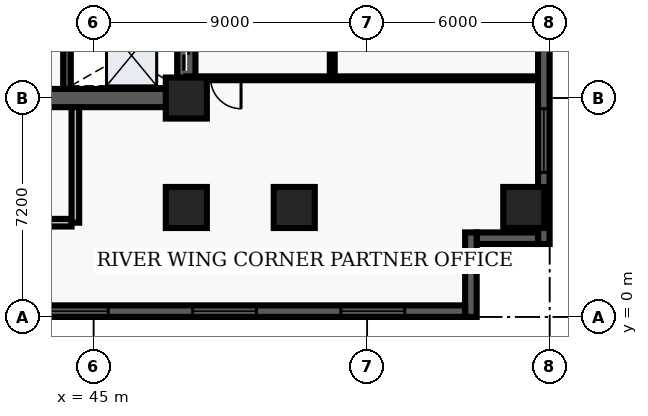
"""IFC4 building model, lengths in metres.
Left out: names, types, materials, properties, quantities, classifications, styles, units other than length and angle.
Written with IfcOpenShell. Run it as: python <this file> out.ifc"""

import sys

from ifc_helpers import new_model, entity, si_unit, converted_unit, direction, frame, origin_with_axes, origin_2d_with_axis, place, context, subcontext, project, spatial, polyline, rectangle, outline, extrude, element, fill, save


model = new_model("IFC4")
c1 = context("Model", 3, precision=1e-05, world=origin_with_axes(), true_north=direction((0.0, 1.0)))
c2 = subcontext(c1, "Body", "Model", "MODEL_VIEW")
j1 = project(units=[si_unit("LENGTHUNIT", "METRE"), converted_unit("PLANEANGLEUNIT", "DEGREE", entity("IfcPlaneAngleMeasure", 0.017), si_unit("PLANEANGLEUNIT", "RADIAN"), dimensions=[0, 0, 0, 0, 0, 0, 0])], contexts=[c1])
p1 = place(None, origin_with_axes())
s1 = spatial("IfcSite", under=j1, at=p1, CompositionType="ELEMENT")
p2 = place(p1, origin_with_axes())
s2 = spatial("IfcBuilding", under=s1, at=p2, CompositionType="ELEMENT")
p3 = place(p2, frame((0.0, 0.0, 60.0), z_axis=(0.0, 0.0, 1.0), x_axis=(1.0, 0.0, 0.0)))
s3 = spatial("IfcBuildingStorey", under=s2, at=p3, CompositionType="ELEMENT", Elevation=60.0)
p4 = place(p3, frame((40.2, 7.2, 0.0), z_axis=(0.0, 0.0, 1.0), x_axis=(1.0, 0.0, 0.0)))
e1 = element("IfcWall", 1, at=p4, inside=s3, PredefinedType="SHEAR", context=c2, shape_type="SweptSolid", body=[
    extrude(outline(polyline([(0.0, -0.3), (7.85, -0.3), (7.85, 0.3), (0.0, 0.3), (0.0, -0.3)])), origin_with_axes(), (0.0, 0.0, 1.0), 3.66),
])
p5 = place(p4, frame((2.175, 0.0, 0.0), z_axis=(0.0, 0.0, 1.0), x_axis=(1.0, 0.0, 0.0)))
e2 = element("IfcOpeningElement", 2, at=p5, cuts=e1, PredefinedType="OPENING", context=c2, shape_type="SweptSolid", body=[
    extrude(rectangle(XDim=1.05, YDim=0.62, at=origin_2d_with_axis()), origin_with_axes(), (0.0, 0.0, 1.0), 2.15),
])
p6 = place(p3, frame((48.05, 7.2, 0.0), z_axis=(0.0, 0.0, 1.0), x_axis=(0.0, 1.0, 0.0)))
e3 = element("IfcWall", 3, at=p6, inside=s3, PredefinedType="SHEAR", context=c2, shape_type="SweptSolid", body=[
    extrude(outline(polyline([(0.0, -0.3), (15.6, -0.3), (15.6, 0.3), (0.0, 0.3), (0.0, -0.3)])), origin_with_axes(), (0.0, 0.0, 1.0), 3.66),
])
p7 = place(p6, frame((1.425, 0.0, 0.0), z_axis=(0.0, 0.0, 1.0), x_axis=(1.0, 0.0, 0.0)))
e4 = element("IfcOpeningElement", 4, at=p7, cuts=e3, PredefinedType="OPENING", context=c2, shape_type="SweptSolid", body=[
    extrude(rectangle(XDim=1.05, YDim=0.62, at=origin_2d_with_axis()), origin_with_axes(), (0.0, 0.0, 1.0), 2.15),
])
p8 = place(p6, frame((3.475, 0.0, 0.0), z_axis=(0.0, 0.0, 1.0), x_axis=(1.0, 0.0, 0.0)))
e5 = element("IfcOpeningElement", 5, at=p8, cuts=e3, PredefinedType="OPENING", context=c2, shape_type="SweptSolid", body=[
    extrude(rectangle(XDim=1.05, YDim=0.62, at=origin_2d_with_axis()), origin_with_axes(), (0.0, 0.0, 1.0), 2.15),
])
p9 = place(p6, frame((5.625, 0.0, 0.0), z_axis=(0.0, 0.0, 1.0), x_axis=(1.0, 0.0, 0.0)))
e6 = element("IfcOpeningElement", 6, at=p9, cuts=e3, PredefinedType="OPENING", context=c2, shape_type="SweptSolid", body=[
    extrude(rectangle(XDim=0.95, YDim=0.62, at=origin_2d_with_axis()), origin_with_axes(), (0.0, 0.0, 1.0), 2.15),
])
p10 = place(p3, frame((44.125, 7.5, 0.0), z_axis=(0.0, 0.0, 1.0), x_axis=(0.0, 1.0, 0.0)))
e7 = element("IfcWall", 7, at=p10, inside=s3, PredefinedType="SHEAR", context=c2, shape_type="SweptSolid", body=[
    extrude(outline(polyline([(0.0, -0.125), (15.0, -0.125), (15.0, 0.125), (0.0, 0.125), (0.0, -0.125)])), origin_with_axes(), (0.0, 0.0, 1.0), 3.66),
])
p11 = place(p3, frame((40.325, 3.1, 0.0), z_axis=(0.0, 0.0, 1.0), x_axis=(1.0, 0.0, 0.0)))
e8 = element("IfcWall", 8, at=p11, inside=s3, PredefinedType="SOLIDWALL", context=c2, shape_type="SweptSolid", body=[
    extrude(outline(polyline([(0.0, -0.125), (3.95, -0.125), (3.95, 0.125), (0.0, 0.125), (0.0, -0.125)])), origin_with_axes(), (0.0, 0.0, 1.0), 2.7),
])
p12 = place(p3, frame((44.4, 3.1, 0.0), z_axis=(0.0, 0.0, 1.0), x_axis=(0.0, 1.0, 0.0)))
e9 = element("IfcWall", 9, at=p12, inside=s3, PredefinedType="SOLIDWALL", context=c2, shape_type="SweptSolid", body=[
    extrude(outline(polyline([(0.0, -0.125), (3.8, -0.125), (3.8, 0.125), (0.0, 0.125), (0.0, -0.125)])), origin_with_axes(), (0.0, 0.0, 1.0), 2.7),
])
for number, where, z_axis, x_axis in (
    (10, (48.05, 3.6, 0.0), (0.0, 0.0, 1.0), (1.0, 0.0, 0.0)),
    (11, (48.05, 7.2, 0.0), (0.0, 0.0, 1.0), (1.0, 0.0, 0.0)),
    (12, (51.6, 3.6, 0.0), (0.0, 0.0, 1.0), (1.0, 0.0, 0.0)),
    (13, (59.15, 3.6, 0.0), (0.0, 0.0, 1.0), (1.0, 0.0, 0.0)),
):
    element("IfcColumn", number, at=place(p3, frame(where, z_axis=z_axis, x_axis=x_axis)), inside=s3, PredefinedType="COLUMN", context=c2, shape_type="SweptSolid", body=[
        extrude(rectangle(XDim=1.35, YDim=1.35, at=origin_2d_with_axis()), origin_with_axes(), (0.0, 0.0, 1.0), 3.9),
    ])
p13 = place(p3, frame((52.85, 7.85, 0.0), z_axis=(0.0, 0.0, 1.0), x_axis=(0.0, 1.0, 0.0)))
e14 = element("IfcWall", 14, at=p13, inside=s3, PredefinedType="PARTITIONING", context=c2, shape_type="SweptSolid", body=[
    extrude(outline(polyline([(0.0, -0.08), (18.8, -0.08), (18.8, 0.08), (0.0, 0.08), (0.0, -0.08)])), origin_with_axes(), (0.0, 0.0, 1.0), 2.7),
])
p14 = place(p13, frame((4.484, 0.0, 0.0), z_axis=(0.0, 0.0, 1.0), x_axis=(1.0, 0.0, 0.0)))
e15 = element("IfcOpeningElement", 15, at=p14, cuts=e14, PredefinedType="OPENING", context=c2, shape_type="SweptSolid", body=[
    extrude(rectangle(XDim=1.0, YDim=0.18, at=origin_2d_with_axis()), origin_with_axes(), (0.0, 0.0, 1.0), 2.15),
])
p15 = place(p13, frame((7.687, 0.0, 0.0), z_axis=(0.0, 0.0, 1.0), x_axis=(1.0, 0.0, 0.0)))
e16 = element("IfcOpeningElement", 16, at=p15, cuts=e14, PredefinedType="OPENING", context=c2, shape_type="SweptSolid", body=[
    extrude(rectangle(XDim=1.0, YDim=0.18, at=origin_2d_with_axis()), origin_with_axes(), (0.0, 0.0, 1.0), 2.15),
])
p16 = place(p13, frame((13.79, 0.0, 0.0), z_axis=(0.0, 0.0, 1.0), x_axis=(1.0, 0.0, 0.0)))
e17 = element("IfcOpeningElement", 17, at=p16, cuts=e14, PredefinedType="OPENING", context=c2, shape_type="SweptSolid", body=[
    extrude(rectangle(XDim=1.0, YDim=0.18, at=origin_2d_with_axis()), origin_with_axes(), (0.0, 0.0, 1.0), 2.15),
])
p17 = place(p3, frame((59.64, 7.85, 0.0), z_axis=(0.0, 0.0, 1.0), x_axis=(-1.0, 0.0, 0.0)))
e18 = element("IfcWall", 18, at=p17, inside=s3, PredefinedType="PARTITIONING", context=c2, shape_type="SweptSolid", body=[
    extrude(outline(polyline([(0.0, -0.062), (11.59, -0.062), (11.59, 0.062), (0.0, 0.062), (0.0, -0.062)])), origin_with_axes(), (0.0, 0.0, 1.0), 2.7),
])
p18 = place(p17, frame((10.29, 0.0, 0.0), z_axis=(0.0, 0.0, 1.0), x_axis=(1.0, 0.0, 0.0)))
e19 = element("IfcOpeningElement", 19, at=p18, cuts=e18, PredefinedType="OPENING", context=c2, shape_type="SweptSolid", body=[
    extrude(rectangle(XDim=1.0, YDim=0.145, at=origin_2d_with_axis()), origin_with_axes(), (0.0, 0.0, 1.0), 2.15),
])
p19 = place(p3, frame((59.81, 26.02, 0.0), z_axis=(0.0, 0.0, 1.0), x_axis=(0.0, -1.0, 0.0)))
e20 = element("IfcWall", 20, at=p19, inside=s3, PredefinedType="SOLIDWALL", context=c2, shape_type="SweptSolid", body=[
    extrude(outline(polyline([(0.0, -0.19), (23.62, -0.19), (23.62, 0.19), (0.0, 0.19), (0.0, -0.19)])), origin_with_axes(), (0.0, 0.0, 1.0), 3.66),
])
p20 = place(p19, frame((3.853, 0.0, 0.45), z_axis=(0.0, 0.0, 1.0), x_axis=(1.0, 0.0, 0.0)))
e21 = element("IfcOpeningElement", 21, at=p20, cuts=e20, PredefinedType="OPENING", context=c2, shape_type="SweptSolid", body=[
    extrude(rectangle(XDim=2.1, YDim=0.4, at=origin_2d_with_axis()), origin_with_axes(), (0.0, 0.0, 1.0), 2.2),
])
p21 = place(p19, frame((20.218, 0.0, 0.45), z_axis=(0.0, 0.0, 1.0), x_axis=(1.0, 0.0, 0.0)))
e22 = element("IfcOpeningElement", 22, at=p21, cuts=e20, PredefinedType="OPENING", context=c2, shape_type="SweptSolid", body=[
    extrude(rectangle(XDim=2.1, YDim=0.4, at=origin_2d_with_axis()), origin_with_axes(), (0.0, 0.0, 1.0), 2.2),
])
p22 = place(p3, frame((59.62, 2.59, 0.0), z_axis=(0.0, 0.0, 1.0), x_axis=(-1.0, 0.0, 0.0)))
e23 = element("IfcWall", 23, at=p22, inside=s3, PredefinedType="SOLIDWALL", context=c2, shape_type="SweptSolid", body=[
    extrude(outline(polyline([(0.0, -0.19), (2.02, -0.19), (2.02, 0.19), (0.0, 0.19), (0.0, -0.19)])), origin_with_axes(), (0.0, 0.0, 1.0), 3.66),
])
p23 = place(p3, frame((57.41, 2.78, 0.0), z_axis=(0.0, 0.0, 1.0), x_axis=(0.0, -1.0, 0.0)))
e24 = element("IfcWall", 24, at=p23, inside=s3, PredefinedType="SOLIDWALL", context=c2, shape_type="SweptSolid", body=[
    extrude(outline(polyline([(0.0, -0.19), (2.78, -0.19), (2.78, 0.19), (0.0, 0.19), (0.0, -0.19)])), origin_with_axes(), (0.0, 0.0, 1.0), 3.66),
])
p24 = place(p3, frame((57.22, 0.19, 0.0), z_axis=(0.0, 0.0, 1.0), x_axis=(-1.0, 0.0, 0.0)))
e25 = element("IfcWall", 25, at=p24, inside=s3, PredefinedType="SOLIDWALL", context=c2, shape_type="SweptSolid", body=[
    extrude(outline(polyline([(0.0, -0.19), (54.82, -0.19), (54.82, 0.19), (0.0, 0.19), (0.0, -0.19)])), origin_with_axes(), (0.0, 0.0, 1.0), 3.66),
])
p25 = place(p24, frame((3.037, 0.0, 0.45), z_axis=(0.0, 0.0, 1.0), x_axis=(1.0, 0.0, 0.0)))
e26 = element("IfcOpeningElement", 26, at=p25, cuts=e25, PredefinedType="OPENING", context=c2, shape_type="SweptSolid", body=[
    extrude(rectangle(XDim=2.1, YDim=0.4, at=origin_2d_with_axis()), origin_with_axes(), (0.0, 0.0, 1.0), 2.2),
])
p26 = place(p24, frame((7.912, 0.0, 0.45), z_axis=(0.0, 0.0, 1.0), x_axis=(1.0, 0.0, 0.0)))
e27 = element("IfcOpeningElement", 27, at=p26, cuts=e25, PredefinedType="OPENING", context=c2, shape_type="SweptSolid", body=[
    extrude(rectangle(XDim=2.1, YDim=0.4, at=origin_2d_with_axis()), origin_with_axes(), (0.0, 0.0, 1.0), 2.2),
])
p27 = place(p24, frame((12.786, 0.0, 0.45), z_axis=(0.0, 0.0, 1.0), x_axis=(1.0, 0.0, 0.0)))
e28 = element("IfcOpeningElement", 28, at=p27, cuts=e25, PredefinedType="OPENING", context=c2, shape_type="SweptSolid", body=[
    extrude(rectangle(XDim=2.1, YDim=0.4, at=origin_2d_with_axis()), origin_with_axes(), (0.0, 0.0, 1.0), 2.2),
])
p28 = place(p24, frame((17.661, 0.0, 0.45), z_axis=(0.0, 0.0, 1.0), x_axis=(1.0, 0.0, 0.0)))
e29 = element("IfcOpeningElement", 29, at=p28, cuts=e25, PredefinedType="OPENING", context=c2, shape_type="SweptSolid", body=[
    extrude(rectangle(XDim=2.1, YDim=0.4, at=origin_2d_with_axis()), origin_with_axes(), (0.0, 0.0, 1.0), 2.2),
])
p29 = place(p24, frame((22.535, 0.0, 0.45), z_axis=(0.0, 0.0, 1.0), x_axis=(1.0, 0.0, 0.0)))
e30 = element("IfcOpeningElement", 30, at=p29, cuts=e25, PredefinedType="OPENING", context=c2, shape_type="SweptSolid", body=[
    extrude(rectangle(XDim=2.1, YDim=0.4, at=origin_2d_with_axis()), origin_with_axes(), (0.0, 0.0, 1.0), 2.2),
])
p30 = place(p24, frame((27.41, 0.0, 0.45), z_axis=(0.0, 0.0, 1.0), x_axis=(1.0, 0.0, 0.0)))
e31 = element("IfcOpeningElement", 31, at=p30, cuts=e25, PredefinedType="OPENING", context=c2, shape_type="SweptSolid", body=[
    extrude(rectangle(XDim=2.1, YDim=0.4, at=origin_2d_with_axis()), origin_with_axes(), (0.0, 0.0, 1.0), 2.2),
])
p31 = place(p24, frame((32.285, 0.0, 0.45), z_axis=(0.0, 0.0, 1.0), x_axis=(1.0, 0.0, 0.0)))
e32 = element("IfcOpeningElement", 32, at=p31, cuts=e25, PredefinedType="OPENING", context=c2, shape_type="SweptSolid", body=[
    extrude(rectangle(XDim=2.1, YDim=0.4, at=origin_2d_with_axis()), origin_with_axes(), (0.0, 0.0, 1.0), 2.2),
])
p32 = place(p24, frame((37.159, 0.0, 0.45), z_axis=(0.0, 0.0, 1.0), x_axis=(1.0, 0.0, 0.0)))
e33 = element("IfcOpeningElement", 33, at=p32, cuts=e25, PredefinedType="OPENING", context=c2, shape_type="SweptSolid", body=[
    extrude(rectangle(XDim=2.1, YDim=0.4, at=origin_2d_with_axis()), origin_with_axes(), (0.0, 0.0, 1.0), 2.2),
])
p33 = place(p24, frame((46.908, 0.0, 0.45), z_axis=(0.0, 0.0, 1.0), x_axis=(1.0, 0.0, 0.0)))
e34 = element("IfcOpeningElement", 34, at=p33, cuts=e25, PredefinedType="OPENING", context=c2, shape_type="SweptSolid", body=[
    extrude(rectangle(XDim=2.1, YDim=0.4, at=origin_2d_with_axis()), origin_with_axes(), (0.0, 0.0, 1.0), 2.2),
])
p34 = place(p24, frame((51.783, 0.0, 0.45), z_axis=(0.0, 0.0, 1.0), x_axis=(1.0, 0.0, 0.0)))
e35 = element("IfcOpeningElement", 35, at=p34, cuts=e25, PredefinedType="OPENING", context=c2, shape_type="SweptSolid", body=[
    extrude(rectangle(XDim=2.1, YDim=0.4, at=origin_2d_with_axis()), origin_with_axes(), (0.0, 0.0, 1.0), 2.2),
])
p35 = place(p6, frame((1.425, 0.0, 0.0), z_axis=(0.0, 0.0, 1.0), x_axis=(1.0, 0.0, 0.0)))
e36 = element("IfcDoor", 36, at=p35, inside=s3, OperationType="SLIDING_TO_LEFT", PredefinedType="DOOR", context=c2, shape_type="SweptSolid", body=[
    extrude(rectangle(XDim=1.05, YDim=0.09, at=origin_2d_with_axis()), origin_with_axes(), (0.0, 0.0, 1.0), 2.15),
])
fill(e4, e36)
p36 = place(p17, frame((10.29, 0.0, 0.0), z_axis=(0.0, 0.0, 1.0), x_axis=(1.0, 0.0, 0.0)))
e37 = element("IfcDoor", 37, at=p36, inside=s3, OperationType="SINGLE_SWING_LEFT", PredefinedType="DOOR", context=c2, shape_type="SweptSolid", body=[
    extrude(rectangle(XDim=1.0, YDim=0.075, at=origin_2d_with_axis()), origin_with_axes(), (0.0, 0.0, 1.0), 2.15),
])
fill(e19, e37)
p37 = place(p19, frame((20.218, 0.0, 0.45), z_axis=(0.0, 0.0, 1.0), x_axis=(1.0, 0.0, 0.0)))
e38 = element("IfcWindow", 38, at=p37, inside=s3, PredefinedType="WINDOW", context=c2, shape_type="SweptSolid", body=[
    extrude(rectangle(XDim=2.1, YDim=0.09, at=origin_2d_with_axis()), origin_with_axes(), (0.0, 0.0, 1.0), 2.2),
])
fill(e22, e38)
p38 = place(p24, frame((3.037, 0.0, 0.45), z_axis=(0.0, 0.0, 1.0), x_axis=(1.0, 0.0, 0.0)))
e39 = element("IfcWindow", 39, at=p38, inside=s3, PredefinedType="WINDOW", context=c2, shape_type="SweptSolid", body=[
    extrude(rectangle(XDim=2.1, YDim=0.09, at=origin_2d_with_axis()), origin_with_axes(), (0.0, 0.0, 1.0), 2.2),
])
fill(e26, e39)
p39 = place(p24, frame((7.912, 0.0, 0.45), z_axis=(0.0, 0.0, 1.0), x_axis=(1.0, 0.0, 0.0)))
e40 = element("IfcWindow", 40, at=p39, inside=s3, PredefinedType="WINDOW", context=c2, shape_type="SweptSolid", body=[
    extrude(rectangle(XDim=2.1, YDim=0.09, at=origin_2d_with_axis()), origin_with_axes(), (0.0, 0.0, 1.0), 2.2),
])
fill(e27, e40)
p40 = place(p24, frame((12.786, 0.0, 0.45), z_axis=(0.0, 0.0, 1.0), x_axis=(1.0, 0.0, 0.0)))
e41 = element("IfcWindow", 41, at=p40, inside=s3, PredefinedType="WINDOW", context=c2, shape_type="SweptSolid", body=[
    extrude(rectangle(XDim=2.1, YDim=0.09, at=origin_2d_with_axis()), origin_with_axes(), (0.0, 0.0, 1.0), 2.2),
])
fill(e28, e41)
save(model, sys.argv[1])
